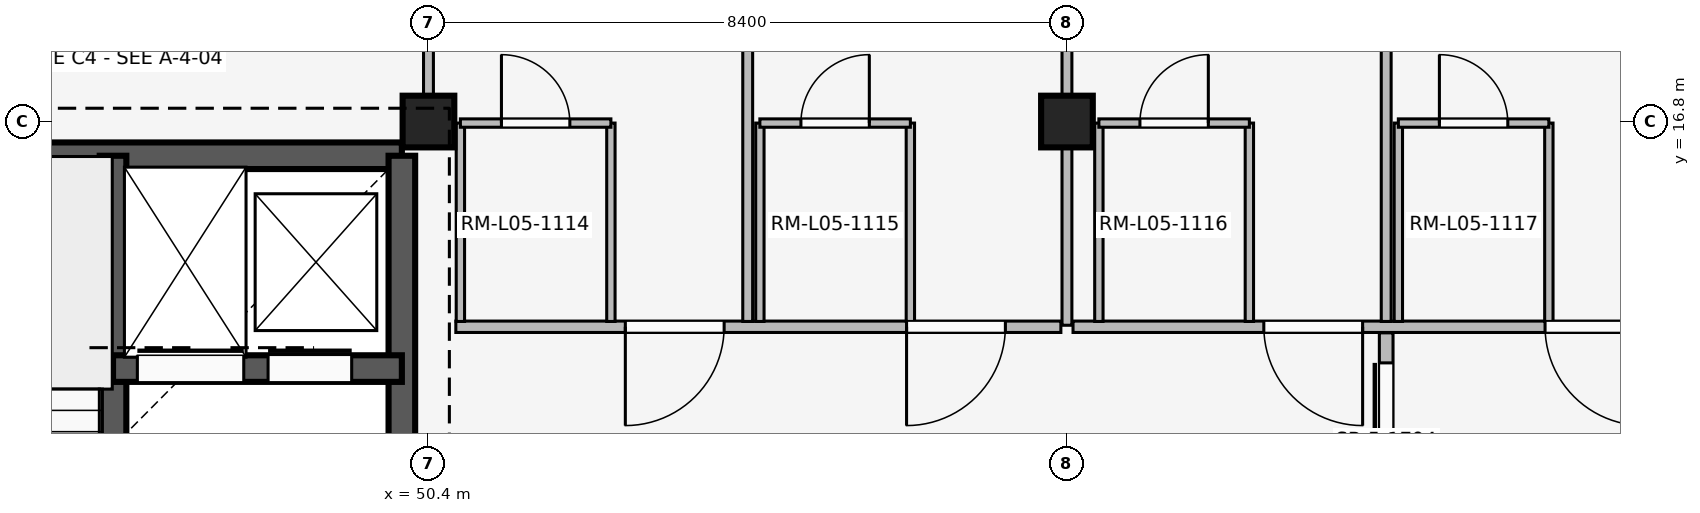
"""IFC4 building model, lengths in metres.
Left out: names, types, materials, properties, quantities, classifications, styles, units other than length and angle.
Written with IfcOpenShell. Run it as: python <this file> out.ifc"""

import sys

from ifc_helpers import new_model, si_unit, direction, frame, frame_2d, origin, origin_2d, place, context, subcontext, project, spatial, rectangle, extrude, element, fill, save


model = new_model("IFC4")
c1 = context("Model", 3, precision=1e-05, world=origin(), true_north=direction((0.0, 1.0)))
c2 = subcontext(c1, "Body", "Model", "MODEL_VIEW")
j1 = project(units=[si_unit("LENGTHUNIT", "METRE"), si_unit("PLANEANGLEUNIT", "RADIAN")], contexts=[c1])
p1 = place(None, origin())
s1 = spatial("IfcSite", under=j1, at=p1, CompositionType="ELEMENT")
p2 = place(p1, origin())
s2 = spatial("IfcBuilding", under=s1, at=p2, CompositionType="ELEMENT")
p3 = place(p2, frame((0.0, 0.0, 20.4)))
s3 = spatial("IfcBuildingStorey", under=s2, at=p3, CompositionType="ELEMENT", Elevation=20.4)
for number, where, z_axis, x_axis in (
    (1, (50.4, 16.8, 0.0), (0.0, 0.0, 1.0), (1.0, 0.0, 0.0)),
    (2, (58.8, 16.8, 0.0), (0.0, 0.0, 1.0), (1.0, 0.0, 0.0)),
):
    element("IfcColumn", number, at=place(p3, frame(where, z_axis=z_axis, x_axis=x_axis)), inside=s3, PredefinedType="COLUMN", context=c2, shape_type="SweptSolid", body=[
        extrude(rectangle(XDim=0.68, YDim=0.68, at=origin_2d()), origin(), (0.0, 0.0, 1.0), 4.2),
    ])
p4 = place(p3, frame((42.55, 16.35, 0.0), z_axis=(0.0, 0.0, 1.0), x_axis=(1.0, 0.0, 0.0)))
e3 = element("IfcWall", 3, at=p4, inside=s3, PredefinedType="SHEAR", context=c2, shape_type="SweptSolid", body=[
    extrude(rectangle(XDim=7.5, YDim=0.35, at=frame_2d((3.75, 0.0))), origin(), (0.0, 0.0, 1.0), 3.92),
])
p5 = place(p3, frame((50.05, 8.8, 0.0), z_axis=(0.0, 0.0, 1.0), x_axis=(0.0, 1.0, 0.0)))
e4 = element("IfcWall", 4, at=p5, inside=s3, PredefinedType="SHEAR", context=c2, shape_type="SweptSolid", body=[
    extrude(rectangle(XDim=7.55, YDim=0.35, at=frame_2d((3.775, 0.0))), origin(), (0.0, 0.0, 1.0), 3.92),
])
p6 = place(p5, frame((2.4, 0.0, 0.0)))
e5 = element("IfcOpeningElement", 5, at=p6, cuts=e4, PredefinedType="OPENING", context=c2, shape_type="SweptSolid", body=[
    extrude(rectangle(XDim=1.2, YDim=2.2, at=frame_2d((0.6, 1.1))), frame((0.0, 0.185, 0.0), z_axis=(0.0, -1.0, 0.0), x_axis=(1.0, 0.0, 0.0)), (0.0, 0.0, 1.0), 0.37),
])
p7 = place(p3, frame((46.25, 8.8, 0.0), z_axis=(0.0, 0.0, 1.0), x_axis=(0.0, 1.0, 0.0)))
e6 = element("IfcWall", 6, at=p7, inside=s3, PredefinedType="SHEAR", context=c2, shape_type="SweptSolid", body=[
    extrude(rectangle(XDim=7.55, YDim=0.35, at=frame_2d((3.775, 0.0))), origin(), (0.0, 0.0, 1.0), 3.92),
])
p8 = place(p7, frame((0.28, 0.0, 0.0)))
e7 = element("IfcOpeningElement", 7, at=p8, cuts=e6, PredefinedType="OPENING", context=c2, shape_type="SweptSolid", body=[
    extrude(rectangle(XDim=1.0, YDim=2.15, at=frame_2d((0.5, 1.075))), frame((0.0, 0.185, 0.0), z_axis=(0.0, -1.0, 0.0), x_axis=(1.0, 0.0, 0.0)), (0.0, 0.0, 1.0), 0.37),
])
p9 = place(p3, frame((46.25, 13.55, 0.0), z_axis=(0.0, 0.0, 1.0), x_axis=(1.0, 0.0, 0.0)))
e8 = element("IfcWall", 8, at=p9, inside=s3, PredefinedType="SHEAR", context=c2, shape_type="SweptSolid", body=[
    extrude(rectangle(XDim=3.8, YDim=0.35, at=frame_2d((1.9, 0.0))), origin(), (0.0, 0.0, 1.0), 3.92),
])
p10 = place(p9, frame((0.32, 0.0, 0.0)))
e9 = element("IfcOpeningElement", 9, at=p10, cuts=e8, PredefinedType="OPENING", context=c2, shape_type="SweptSolid", body=[
    extrude(rectangle(XDim=1.4, YDim=2.25, at=frame_2d((0.7, 1.125))), frame((0.0, 0.185, 0.0), z_axis=(0.0, -1.0, 0.0), x_axis=(1.0, 0.0, 0.0)), (0.0, 0.0, 1.0), 0.37),
])
p11 = place(p9, frame((2.04, 0.0, 0.0)))
e10 = element("IfcOpeningElement", 10, at=p11, cuts=e8, PredefinedType="OPENING", context=c2, shape_type="SweptSolid", body=[
    extrude(rectangle(XDim=1.1, YDim=2.15, at=frame_2d((0.55, 1.075))), frame((0.0, 0.185, 0.0), z_axis=(0.0, -1.0, 0.0), x_axis=(1.0, 0.0, 0.0)), (0.0, 0.0, 1.0), 0.37),
])
p12 = place(p3, frame((50.4, 17.15, 0.0), z_axis=(0.0, 0.0, 1.0), x_axis=(0.0, 1.0, 0.0)))
e11 = element("IfcWall", 11, at=p12, inside=s3, PredefinedType="PARTITIONING", context=c2, shape_type="SweptSolid", body=[
    extrude(rectangle(XDim=7.91, YDim=0.13, at=frame_2d((3.955, 0.0))), origin(), (0.0, 0.0, 1.0), 3.32),
])
p13 = place(p12, frame((3.4, 0.0, 0.0)))
e12 = element("IfcOpeningElement", 12, at=p13, cuts=e11, PredefinedType="OPENING", context=c2, shape_type="SweptSolid", body=[
    extrude(rectangle(XDim=1.05, YDim=2.2, at=frame_2d((0.525, 1.1))), frame((0.0, 0.075, 0.0), z_axis=(0.0, -1.0, 0.0), x_axis=(1.0, 0.0, 0.0)), (0.0, 0.0, 1.0), 0.15),
])
p14 = place(p3, frame((58.72, 14.1, 0.0), z_axis=(0.0, 0.0, 1.0), x_axis=(-1.0, 0.0, 0.0)))
e13 = element("IfcWall", 13, at=p14, inside=s3, PredefinedType="PARTITIONING", context=c2, shape_type="SweptSolid", body=[
    extrude(rectangle(XDim=7.96, YDim=0.15, at=frame_2d((3.98, 0.0))), origin(), (0.0, 0.0, 1.0), 3.32),
])
p15 = place(p14, frame((0.73, 0.0, 0.0)))
e14 = element("IfcOpeningElement", 14, at=p15, cuts=e13, PredefinedType="OPENING", context=c2, shape_type="SweptSolid", body=[
    extrude(rectangle(XDim=1.3, YDim=2.25, at=frame_2d((0.65, 1.125))), frame((0.0, 0.085, 0.0), z_axis=(0.0, -1.0, 0.0), x_axis=(1.0, 0.0, 0.0)), (0.0, 0.0, 1.0), 0.17),
])
p16 = place(p14, frame((4.43, 0.0, 0.0)))
e15 = element("IfcOpeningElement", 15, at=p16, cuts=e13, PredefinedType="OPENING", context=c2, shape_type="SweptSolid", body=[
    extrude(rectangle(XDim=1.3, YDim=2.25, at=frame_2d((0.65, 1.125))), frame((0.0, 0.085, 0.0), z_axis=(0.0, -1.0, 0.0), x_axis=(1.0, 0.0, 0.0)), (0.0, 0.0, 1.0), 0.17),
])
p17 = place(p3, frame((54.6, 14.17, 0.0), z_axis=(0.0, 0.0, 1.0), x_axis=(0.0, 1.0, 0.0)))
e16 = element("IfcWall", 16, at=p17, inside=s3, PredefinedType="PARTITIONING", context=c2, shape_type="SweptSolid", body=[
    extrude(rectangle(XDim=10.93, YDim=0.13, at=frame_2d((5.465, 0.0))), origin(), (0.0, 0.0, 1.0), 3.32),
])
for number, where, z_axis, x_axis in (
    (17, (50.82, 14.17, 0.0), (0.0, 0.0, 1.0), (0.0, 1.0, 0.0)),
    (18, (52.8, 14.17, 0.0), (0.0, 0.0, 1.0), (0.0, 1.0, 0.0)),
):
    element("IfcWall", number, at=place(p3, frame(where, z_axis=z_axis, x_axis=x_axis)), inside=s3, PredefinedType="PARTITIONING", context=c2, shape_type="SweptSolid", body=[
        extrude(rectangle(XDim=2.61, YDim=0.11, at=frame_2d((1.305, 0.0))), origin(), (0.0, 0.0, 1.0), 3.32),
    ])
p18 = place(p3, frame((50.82, 16.78, 0.0), z_axis=(0.0, 0.0, 1.0), x_axis=(1.0, 0.0, 0.0)))
e19 = element("IfcWall", 19, at=p18, inside=s3, PredefinedType="PARTITIONING", context=c2, shape_type="SweptSolid", body=[
    extrude(rectangle(XDim=1.98, YDim=0.11, at=frame_2d((0.99, 0.0))), origin(), (0.0, 0.0, 1.0), 3.32),
])
p19 = place(p18, frame((0.54, 0.0, 0.0)))
e20 = element("IfcOpeningElement", 20, at=p19, cuts=e19, PredefinedType="OPENING", context=c2, shape_type="SweptSolid", body=[
    extrude(rectangle(XDim=0.9, YDim=2.1, at=frame_2d((0.45, 1.05))), frame((0.0, 0.065, 0.0), z_axis=(0.0, -1.0, 0.0), x_axis=(1.0, 0.0, 0.0)), (0.0, 0.0, 1.0), 0.13),
])
for number, where, z_axis, x_axis in (
    (21, (54.76, 14.17, 0.0), (0.0, 0.0, 1.0), (0.0, 1.0, 0.0)),
    (22, (56.74, 14.17, 0.0), (0.0, 0.0, 1.0), (0.0, 1.0, 0.0)),
):
    element("IfcWall", number, at=place(p3, frame(where, z_axis=z_axis, x_axis=x_axis)), inside=s3, PredefinedType="PARTITIONING", context=c2, shape_type="SweptSolid", body=[
        extrude(rectangle(XDim=2.61, YDim=0.11, at=frame_2d((1.305, 0.0))), origin(), (0.0, 0.0, 1.0), 3.32),
    ])
p20 = place(p3, frame((54.76, 16.78, 0.0), z_axis=(0.0, 0.0, 1.0), x_axis=(1.0, 0.0, 0.0)))
e23 = element("IfcWall", 23, at=p20, inside=s3, PredefinedType="PARTITIONING", context=c2, shape_type="SweptSolid", body=[
    extrude(rectangle(XDim=1.98, YDim=0.11, at=frame_2d((0.99, 0.0))), origin(), (0.0, 0.0, 1.0), 3.32),
])
p21 = place(p20, frame((0.54, 0.0, 0.0)))
e24 = element("IfcOpeningElement", 24, at=p21, cuts=e23, PredefinedType="OPENING", context=c2, shape_type="SweptSolid", body=[
    extrude(rectangle(XDim=0.9, YDim=2.1, at=frame_2d((0.45, 1.05))), frame((0.0, 0.065, 0.0), z_axis=(0.0, -1.0, 0.0), x_axis=(1.0, 0.0, 0.0)), (0.0, 0.0, 1.0), 0.13),
])
p22 = place(p3, frame((58.8, 14.12, 0.0), z_axis=(0.0, 0.0, 1.0), x_axis=(0.0, 1.0, 0.0)))
e25 = element("IfcWall", 25, at=p22, inside=s3, PredefinedType="PARTITIONING", context=c2, shape_type="SweptSolid", body=[
    extrude(rectangle(XDim=10.94, YDim=0.13, at=frame_2d((5.47, 0.0))), origin(), (0.0, 0.0, 1.0), 3.32),
])
p23 = place(p3, frame((67.12, 14.1, 0.0), z_axis=(0.0, 0.0, 1.0), x_axis=(-1.0, 0.0, 0.0)))
e26 = element("IfcWall", 26, at=p23, inside=s3, PredefinedType="PARTITIONING", context=c2, shape_type="SweptSolid", body=[
    extrude(rectangle(XDim=8.24, YDim=0.15, at=frame_2d((4.12, 0.0))), origin(), (0.0, 0.0, 1.0), 3.32),
])
p24 = place(p23, frame((0.73, 0.0, 0.0)))
e27 = element("IfcOpeningElement", 27, at=p24, cuts=e26, PredefinedType="OPENING", context=c2, shape_type="SweptSolid", body=[
    extrude(rectangle(XDim=1.3, YDim=2.25, at=frame_2d((0.65, 1.125))), frame((0.0, 0.085, 0.0), z_axis=(0.0, -1.0, 0.0), x_axis=(1.0, 0.0, 0.0)), (0.0, 0.0, 1.0), 0.17),
])
p25 = place(p23, frame((4.43, 0.0, 0.0)))
e28 = element("IfcOpeningElement", 28, at=p25, cuts=e26, PredefinedType="OPENING", context=c2, shape_type="SweptSolid", body=[
    extrude(rectangle(XDim=1.3, YDim=2.25, at=frame_2d((0.65, 1.125))), frame((0.0, 0.085, 0.0), z_axis=(0.0, -1.0, 0.0), x_axis=(1.0, 0.0, 0.0)), (0.0, 0.0, 1.0), 0.17),
])
p26 = place(p3, frame((63.0, 14.17, 0.0), z_axis=(0.0, 0.0, 1.0), x_axis=(0.0, 1.0, 0.0)))
e29 = element("IfcWall", 29, at=p26, inside=s3, PredefinedType="PARTITIONING", context=c2, shape_type="SweptSolid", body=[
    extrude(rectangle(XDim=10.93, YDim=0.13, at=frame_2d((5.465, 0.0))), origin(), (0.0, 0.0, 1.0), 3.32),
])
for number, where, z_axis, x_axis in (
    (30, (59.22, 14.17, 0.0), (0.0, 0.0, 1.0), (0.0, 1.0, 0.0)),
    (31, (61.2, 14.17, 0.0), (0.0, 0.0, 1.0), (0.0, 1.0, 0.0)),
):
    element("IfcWall", number, at=place(p3, frame(where, z_axis=z_axis, x_axis=x_axis)), inside=s3, PredefinedType="PARTITIONING", context=c2, shape_type="SweptSolid", body=[
        extrude(rectangle(XDim=2.61, YDim=0.11, at=frame_2d((1.305, 0.0))), origin(), (0.0, 0.0, 1.0), 3.32),
    ])
p27 = place(p3, frame((59.22, 16.78, 0.0), z_axis=(0.0, 0.0, 1.0), x_axis=(1.0, 0.0, 0.0)))
e32 = element("IfcWall", 32, at=p27, inside=s3, PredefinedType="PARTITIONING", context=c2, shape_type="SweptSolid", body=[
    extrude(rectangle(XDim=1.98, YDim=0.11, at=frame_2d((0.99, 0.0))), origin(), (0.0, 0.0, 1.0), 3.32),
])
p28 = place(p27, frame((0.54, 0.0, 0.0)))
e33 = element("IfcOpeningElement", 33, at=p28, cuts=e32, PredefinedType="OPENING", context=c2, shape_type="SweptSolid", body=[
    extrude(rectangle(XDim=0.9, YDim=2.1, at=frame_2d((0.45, 1.05))), frame((0.0, 0.065, 0.0), z_axis=(0.0, -1.0, 0.0), x_axis=(1.0, 0.0, 0.0)), (0.0, 0.0, 1.0), 0.13),
])
for number, where, z_axis, x_axis in (
    (34, (63.16, 14.17, 0.0), (0.0, 0.0, 1.0), (0.0, 1.0, 0.0)),
    (35, (65.14, 14.17, 0.0), (0.0, 0.0, 1.0), (0.0, 1.0, 0.0)),
):
    element("IfcWall", number, at=place(p3, frame(where, z_axis=z_axis, x_axis=x_axis)), inside=s3, PredefinedType="PARTITIONING", context=c2, shape_type="SweptSolid", body=[
        extrude(rectangle(XDim=2.61, YDim=0.11, at=frame_2d((1.305, 0.0))), origin(), (0.0, 0.0, 1.0), 3.32),
    ])
p29 = place(p3, frame((63.16, 16.78, 0.0), z_axis=(0.0, 0.0, 1.0), x_axis=(1.0, 0.0, 0.0)))
e36 = element("IfcWall", 36, at=p29, inside=s3, PredefinedType="PARTITIONING", context=c2, shape_type="SweptSolid", body=[
    extrude(rectangle(XDim=1.98, YDim=0.11, at=frame_2d((0.99, 0.0))), origin(), (0.0, 0.0, 1.0), 3.32),
])
p30 = place(p29, frame((0.54, 0.0, 0.0)))
e37 = element("IfcOpeningElement", 37, at=p30, cuts=e36, PredefinedType="OPENING", context=c2, shape_type="SweptSolid", body=[
    extrude(rectangle(XDim=0.9, YDim=2.1, at=frame_2d((0.45, 1.05))), frame((0.0, 0.065, 0.0), z_axis=(0.0, -1.0, 0.0), x_axis=(1.0, 0.0, 0.0)), (0.0, 0.0, 1.0), 0.13),
])
p31 = place(p3, frame((63.0, 11.18, 0.0), z_axis=(0.0, 0.0, 1.0), x_axis=(0.0, 1.0, 0.0)))
e38 = element("IfcWall", 38, at=p31, inside=s3, PredefinedType="PARTITIONING", context=c2, shape_type="SweptSolid", body=[
    extrude(rectangle(XDim=2.84, YDim=0.18, at=frame_2d((1.42, 0.0))), origin(), (0.0, 0.0, 1.0), 3.32),
])
p32 = place(p31, frame((0.395, 0.0, 0.0)))
e39 = element("IfcOpeningElement", 39, at=p32, cuts=e38, PredefinedType="OPENING", context=c2, shape_type="SweptSolid", body=[
    extrude(rectangle(XDim=2.05, YDim=2.35, at=frame_2d((1.025, 1.175))), frame((0.0, 0.1, 0.0), z_axis=(0.0, -1.0, 0.0), x_axis=(1.0, 0.0, 0.0)), (0.0, 0.0, 1.0), 0.2),
])
p33 = place(p10, origin())
e40 = element("IfcDoor", 40, at=p33, inside=s3, OperationType="SLIDING_TO_LEFT", PredefinedType="DOOR", context=c2, shape_type="SweptSolid", body=[
    extrude(rectangle(XDim=1.4, YDim=2.25, at=frame_2d((0.7, 1.125))), frame((0.0, 0.025, 0.0), z_axis=(0.0, -1.0, 0.0), x_axis=(1.0, 0.0, 0.0)), (0.0, 0.0, 1.0), 0.05),
])
fill(e9, e40)
p34 = place(p11, origin())
e41 = element("IfcDoor", 41, at=p34, inside=s3, OperationType="SLIDING_TO_LEFT", PredefinedType="DOOR", context=c2, shape_type="SweptSolid", body=[
    extrude(rectangle(XDim=1.1, YDim=2.15, at=frame_2d((0.55, 1.075))), frame((0.0, 0.025, 0.0), z_axis=(0.0, -1.0, 0.0), x_axis=(1.0, 0.0, 0.0)), (0.0, 0.0, 1.0), 0.05),
])
fill(e10, e41)
p35 = place(p15, origin())
e42 = element("IfcDoor", 42, at=p35, inside=s3, OperationType="SINGLE_SWING_RIGHT", PredefinedType="DOOR", context=c2, shape_type="SweptSolid", body=[
    extrude(rectangle(XDim=1.3, YDim=2.25, at=frame_2d((0.65, 1.125))), frame((0.0, 0.025, 0.0), z_axis=(0.0, -1.0, 0.0), x_axis=(1.0, 0.0, 0.0)), (0.0, 0.0, 1.0), 0.05),
])
fill(e14, e42)
p36 = place(p16, origin())
e43 = element("IfcDoor", 43, at=p36, inside=s3, OperationType="SINGLE_SWING_RIGHT", PredefinedType="DOOR", context=c2, shape_type="SweptSolid", body=[
    extrude(rectangle(XDim=1.3, YDim=2.25, at=frame_2d((0.65, 1.125))), frame((0.0, 0.025, 0.0), z_axis=(0.0, -1.0, 0.0), x_axis=(1.0, 0.0, 0.0)), (0.0, 0.0, 1.0), 0.05),
])
fill(e15, e43)
p37 = place(p19, origin())
e44 = element("IfcDoor", 44, at=p37, inside=s3, OperationType="SINGLE_SWING_LEFT", PredefinedType="DOOR", context=c2, shape_type="SweptSolid", body=[
    extrude(rectangle(XDim=0.9, YDim=2.1, at=frame_2d((0.45, 1.05))), frame((0.0, 0.025, 0.0), z_axis=(0.0, -1.0, 0.0), x_axis=(1.0, 0.0, 0.0)), (0.0, 0.0, 1.0), 0.05),
])
fill(e20, e44)
p38 = place(p21, origin())
e45 = element("IfcDoor", 45, at=p38, inside=s3, OperationType="SINGLE_SWING_RIGHT", PredefinedType="DOOR", context=c2, shape_type="SweptSolid", body=[
    extrude(rectangle(XDim=0.9, YDim=2.1, at=frame_2d((0.45, 1.05))), frame((0.0, 0.025, 0.0), z_axis=(0.0, -1.0, 0.0), x_axis=(1.0, 0.0, 0.0)), (0.0, 0.0, 1.0), 0.05),
])
fill(e24, e45)
p39 = place(p24, origin())
e46 = element("IfcDoor", 46, at=p39, inside=s3, OperationType="SINGLE_SWING_LEFT", PredefinedType="DOOR", context=c2, shape_type="SweptSolid", body=[
    extrude(rectangle(XDim=1.3, YDim=2.25, at=frame_2d((0.65, 1.125))), frame((0.0, 0.025, 0.0), z_axis=(0.0, -1.0, 0.0), x_axis=(1.0, 0.0, 0.0)), (0.0, 0.0, 1.0), 0.05),
])
fill(e27, e46)
p40 = place(p25, origin())
e47 = element("IfcDoor", 47, at=p40, inside=s3, OperationType="SINGLE_SWING_LEFT", PredefinedType="DOOR", context=c2, shape_type="SweptSolid", body=[
    extrude(rectangle(XDim=1.3, YDim=2.25, at=frame_2d((0.65, 1.125))), frame((0.0, 0.025, 0.0), z_axis=(0.0, -1.0, 0.0), x_axis=(1.0, 0.0, 0.0)), (0.0, 0.0, 1.0), 0.05),
])
fill(e28, e47)
p41 = place(p28, origin())
e48 = element("IfcDoor", 48, at=p41, inside=s3, OperationType="SINGLE_SWING_RIGHT", PredefinedType="DOOR", context=c2, shape_type="SweptSolid", body=[
    extrude(rectangle(XDim=0.9, YDim=2.1, at=frame_2d((0.45, 1.05))), frame((0.0, 0.025, 0.0), z_axis=(0.0, -1.0, 0.0), x_axis=(1.0, 0.0, 0.0)), (0.0, 0.0, 1.0), 0.05),
])
fill(e33, e48)
p42 = place(p30, origin())
e49 = element("IfcDoor", 49, at=p42, inside=s3, OperationType="SINGLE_SWING_LEFT", PredefinedType="DOOR", context=c2, shape_type="SweptSolid", body=[
    extrude(rectangle(XDim=0.9, YDim=2.1, at=frame_2d((0.45, 1.05))), frame((0.0, 0.025, 0.0), z_axis=(0.0, -1.0, 0.0), x_axis=(1.0, 0.0, 0.0)), (0.0, 0.0, 1.0), 0.05),
])
fill(e37, e49)
p43 = place(p32, origin())
e50 = element("IfcDoor", 50, at=p43, inside=s3, OperationType="SLIDING_TO_LEFT", PredefinedType="DOOR", context=c2, shape_type="SweptSolid", body=[
    extrude(rectangle(XDim=2.05, YDim=2.35, at=frame_2d((1.025, 1.175))), frame((0.0, 0.025, 0.0), z_axis=(0.0, -1.0, 0.0), x_axis=(1.0, 0.0, 0.0)), (0.0, 0.0, 1.0), 0.05),
])
fill(e39, e50)
save(model, sys.argv[1])
